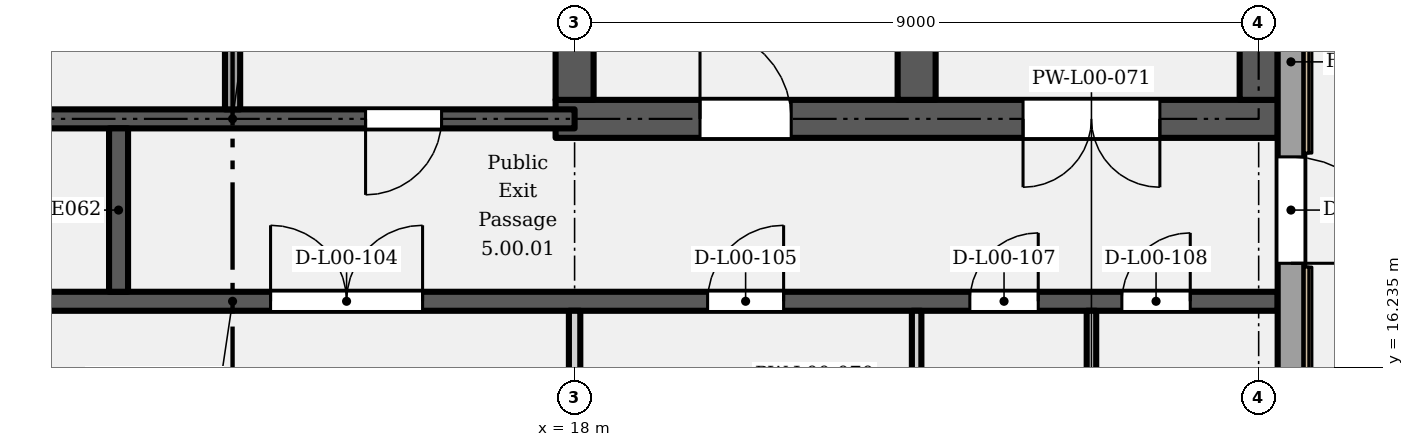
"""IFC4 building model, lengths in metres.
Left out: names, types, materials, properties, quantities, classifications, styles, units other than length and angle.
Written with IfcOpenShell. Run it as: python <this file> out.ifc"""

import sys

from ifc_helpers import new_model, si_unit, direction, frame, frame_2d, origin, place, context, subcontext, project, spatial, rectangle, extrude, element, fill, save


model = new_model("IFC4")
c1 = context("Model", 3, precision=1e-05, world=origin(), true_north=direction((0.0, 1.0)))
c2 = subcontext(c1, "Body", "Model", "MODEL_VIEW")
j1 = project(units=[si_unit("LENGTHUNIT", "METRE"), si_unit("PLANEANGLEUNIT", "RADIAN")], contexts=[c1])
p1 = place(None, origin())
s1 = spatial("IfcSite", under=j1, at=p1, CompositionType="ELEMENT")
p2 = place(p1, origin())
s2 = spatial("IfcBuilding", under=s1, at=p2, CompositionType="ELEMENT")
p3 = place(p2, origin())
s3 = spatial("IfcBuildingStorey", under=s2, at=p3, CompositionType="ELEMENT", Elevation=0.0)
p4 = place(p3, frame((17.75, 19.5, 0.0), z_axis=(0.0, 0.0, 1.0), x_axis=(1.0, 0.0, 0.0)))
e1 = element("IfcWall", 1, at=p4, inside=s3, PredefinedType="SHEAR", context=c2, shape_type="SweptSolid", body=[
    extrude(rectangle(XDim=9.5, YDim=0.5, at=frame_2d((4.75, 0.0))), origin(), (0.0, 0.0, 1.0), 6.3),
])
p5 = place(p4, frame((1.9, 0.0, 0.0)))
e2 = element("IfcOpeningElement", 2, at=p5, cuts=e1, PredefinedType="OPENING", context=c2, shape_type="SweptSolid", body=[
    extrude(rectangle(XDim=1.2, YDim=2.1, at=frame_2d((0.6, 1.05))), frame((0.0, 0.26, 0.0), z_axis=(0.0, -1.0, 0.0), x_axis=(1.0, 0.0, 0.0)), (0.0, 0.0, 1.0), 0.52),
])
p6 = place(p4, frame((7.95, 0.0, 0.0), z_axis=(0.0, 0.0, 1.0), x_axis=(-1.0, 0.0, 0.0)))
e3 = element("IfcOpeningElement", 3, at=p6, cuts=e1, PredefinedType="OPENING", context=c2, shape_type="SweptSolid", body=[
    extrude(rectangle(XDim=1.8, YDim=2.1, at=frame_2d((0.9, 1.05))), frame((0.0, 0.26, 0.0), z_axis=(0.0, -1.0, 0.0), x_axis=(1.0, 0.0, 0.0)), (0.0, 0.0, 1.0), 0.52),
])
p7 = place(p3, frame((18.0, 19.75, 0.0), z_axis=(0.0, 0.0, 1.0), x_axis=(0.0, 1.0, 0.0)))
e4 = element("IfcWall", 4, at=p7, inside=s3, PredefinedType="SHEAR", context=c2, shape_type="SweptSolid", body=[
    extrude(rectangle(XDim=8.05, YDim=0.5, at=frame_2d((4.025, 0.0))), origin(), (0.0, 0.0, 1.0), 6.3),
])
p8 = place(p3, frame((22.5, 19.75, 0.0), z_axis=(0.0, 0.0, 1.0), x_axis=(0.0, 1.0, 0.0)))
e5 = element("IfcWall", 5, at=p8, inside=s3, PredefinedType="SHEAR", context=c2, shape_type="SweptSolid", body=[
    extrude(rectangle(XDim=8.5, YDim=0.5, at=frame_2d((4.25, 0.0))), origin(), (0.0, 0.0, 1.0), 6.3),
])
p9 = place(p3, frame((27.0, 19.75, 0.0), z_axis=(0.0, 0.0, 1.0), x_axis=(0.0, 1.0, 0.0)))
e6 = element("IfcWall", 6, at=p9, inside=s3, PredefinedType="SHEAR", context=c2, shape_type="SweptSolid", body=[
    extrude(rectangle(XDim=8.05, YDim=0.5, at=frame_2d((4.025, 0.0))), origin(), (0.0, 0.0, 1.0), 6.3),
])
p10 = place(p3, frame((27.425, 12.7, 0.0), z_axis=(0.0, 0.0, 1.0), x_axis=(0.0, 1.0, 0.0)))
e7 = element("IfcWall", 7, at=p10, inside=s3, PredefinedType="SOLIDWALL", context=c2, shape_type="SweptSolid", body=[
    extrude(rectangle(XDim=15.1, YDim=0.35, at=frame_2d((7.55, 0.0))), origin(), (0.0, 0.0, 1.0), 6.3),
])
p11 = place(p10, frame((6.3, 0.0, 0.0), z_axis=(0.0, 0.0, 1.0), x_axis=(-1.0, 0.0, 0.0)))
e8 = element("IfcOpeningElement", 8, at=p11, cuts=e7, PredefinedType="OPENING", context=c2, shape_type="SweptSolid", body=[
    extrude(rectangle(XDim=1.4, YDim=2.1, at=frame_2d((0.7, 1.05))), frame((0.0, 0.185, 0.0), z_axis=(0.0, -1.0, 0.0), x_axis=(1.0, 0.0, 0.0)), (0.0, 0.0, 1.0), 0.37),
])
p12 = place(p3, frame((-0.25, 17.1, 0.0), z_axis=(0.0, 0.0, 1.0), x_axis=(1.0, 0.0, 0.0)))
e9 = element("IfcWall", 9, at=p12, inside=s3, PredefinedType="SHEAR", context=c2, shape_type="SweptSolid", body=[
    extrude(rectangle(XDim=27.5, YDim=0.25, at=frame_2d((13.75, 0.0))), origin(), (0.0, 0.0, 1.0), 6.3),
])
p13 = place(p12, frame((4.15, 0.0, 0.0)))
e10 = element("IfcOpeningElement", 10, at=p13, cuts=e9, PredefinedType="OPENING", context=c2, shape_type="SweptSolid", body=[
    extrude(rectangle(XDim=1.2, YDim=2.1, at=frame_2d((0.6, 1.05))), frame((0.0, 0.135, 0.0), z_axis=(0.0, -1.0, 0.0), x_axis=(1.0, 0.0, 0.0)), (0.0, 0.0, 1.0), 0.27),
])
p14 = place(p12, frame((14.25, 0.0, 0.0)))
e11 = element("IfcOpeningElement", 11, at=p14, cuts=e9, PredefinedType="OPENING", context=c2, shape_type="SweptSolid", body=[
    extrude(rectangle(XDim=2.0, YDim=2.1, at=frame_2d((1.0, 1.05))), frame((0.0, 0.135, 0.0), z_axis=(0.0, -1.0, 0.0), x_axis=(1.0, 0.0, 0.0)), (0.0, 0.0, 1.0), 0.27),
])
p15 = place(p12, frame((20.0, 0.0, 0.0)))
e12 = element("IfcOpeningElement", 12, at=p15, cuts=e9, PredefinedType="OPENING", context=c2, shape_type="SweptSolid", body=[
    extrude(rectangle(XDim=1.0, YDim=2.1, at=frame_2d((0.5, 1.05))), frame((0.0, 0.135, 0.0), z_axis=(0.0, -1.0, 0.0), x_axis=(1.0, 0.0, 0.0)), (0.0, 0.0, 1.0), 0.27),
])
p16 = place(p12, frame((23.45, 0.0, 0.0)))
e13 = element("IfcOpeningElement", 13, at=p16, cuts=e9, PredefinedType="OPENING", context=c2, shape_type="SweptSolid", body=[
    extrude(rectangle(XDim=0.9, YDim=2.1, at=frame_2d((0.45, 1.05))), frame((0.0, 0.135, 0.0), z_axis=(0.0, -1.0, 0.0), x_axis=(1.0, 0.0, 0.0)), (0.0, 0.0, 1.0), 0.27),
])
p17 = place(p12, frame((25.45, 0.0, 0.0)))
e14 = element("IfcOpeningElement", 14, at=p17, cuts=e9, PredefinedType="OPENING", context=c2, shape_type="SweptSolid", body=[
    extrude(rectangle(XDim=0.9, YDim=2.1, at=frame_2d((0.45, 1.05))), frame((0.0, 0.135, 0.0), z_axis=(0.0, -1.0, 0.0), x_axis=(1.0, 0.0, 0.0)), (0.0, 0.0, 1.0), 0.27),
])
p18 = place(p3, frame((9.0, 19.5, 0.0), z_axis=(0.0, 0.0, 1.0), x_axis=(1.0, 0.0, 0.0)))
e15 = element("IfcWall", 15, at=p18, inside=s3, PredefinedType="SHEAR", context=c2, shape_type="SweptSolid", body=[
    extrude(rectangle(XDim=9.0, YDim=0.25, at=frame_2d((4.5, 0.0))), origin(), (0.0, 0.0, 1.0), 6.3),
])
p19 = place(p18, frame((2.0, 0.0, 0.0), z_axis=(0.0, 0.0, 1.0), x_axis=(-1.0, 0.0, 0.0)))
e16 = element("IfcOpeningElement", 16, at=p19, cuts=e15, PredefinedType="OPENING", context=c2, shape_type="SweptSolid", body=[
    extrude(rectangle(XDim=1.0, YDim=2.1, at=frame_2d((0.5, 1.05))), frame((0.0, 0.135, 0.0), z_axis=(0.0, -1.0, 0.0), x_axis=(1.0, 0.0, 0.0)), (0.0, 0.0, 1.0), 0.27),
])
p20 = place(p18, frame((7.25, 0.0, 0.0), z_axis=(0.0, 0.0, 1.0), x_axis=(-1.0, 0.0, 0.0)))
e17 = element("IfcOpeningElement", 17, at=p20, cuts=e15, PredefinedType="OPENING", context=c2, shape_type="SweptSolid", body=[
    extrude(rectangle(XDim=1.0, YDim=2.1, at=frame_2d((0.5, 1.05))), frame((0.0, 0.135, 0.0), z_axis=(0.0, -1.0, 0.0), x_axis=(1.0, 0.0, 0.0)), (0.0, 0.0, 1.0), 0.27),
])
p21 = place(p3, frame((12.0, 17.225, 0.0), z_axis=(0.0, 0.0, 1.0), x_axis=(0.0, 1.0, 0.0)))
e18 = element("IfcWall", 18, at=p21, inside=s3, PredefinedType="SHEAR", context=c2, shape_type="SweptSolid", body=[
    extrude(rectangle(XDim=2.15, YDim=0.25, at=frame_2d((1.075, 0.0))), origin(), (0.0, 0.0, 1.0), 6.3),
])
p22 = place(p3, frame((13.5, 19.625, 0.0), z_axis=(0.0, 0.0, 1.0), x_axis=(0.0, 1.0, 0.0)))
e19 = element("IfcWall", 19, at=p22, inside=s3, PredefinedType="PARTITIONING", context=c2, shape_type="SweptSolid", body=[
    extrude(rectangle(XDim=3.375, YDim=0.2, at=frame_2d((1.688, 0.0))), origin(), (0.0, 0.0, 1.0), 6.3),
])
p23 = place(p3, frame((18.0, 12.7, 0.0), z_axis=(0.0, 0.0, 1.0), x_axis=(0.0, 1.0, 0.0)))
e20 = element("IfcWall", 20, at=p23, inside=s3, PredefinedType="PARTITIONING", context=c2, shape_type="SweptSolid", body=[
    extrude(rectangle(XDim=4.275, YDim=0.15, at=frame_2d((2.138, 0.0))), origin(), (0.0, 0.0, 1.0), 5.35),
])
p24 = place(p3, frame((22.5, 12.6, 0.0), z_axis=(0.0, 0.0, 1.0), x_axis=(0.0, 1.0, 0.0)))
e21 = element("IfcWall", 21, at=p24, inside=s3, PredefinedType="PARTITIONING", context=c2, shape_type="SweptSolid", body=[
    extrude(rectangle(XDim=4.375, YDim=0.125, at=frame_2d((2.188, 0.0))), origin(), (0.0, 0.0, 1.0), 6.3),
])
p25 = place(p3, frame((24.8, 12.663, 0.0), z_axis=(0.0, 0.0, 1.0), x_axis=(0.0, 1.0, 0.0)))
e22 = element("IfcWall", 22, at=p25, inside=s3, PredefinedType="PARTITIONING", context=c2, shape_type="SweptSolid", body=[
    extrude(rectangle(XDim=4.312, YDim=0.125, at=frame_2d((2.156, 0.0))), origin(), (0.0, 0.0, 1.0), 6.3),
])
p26 = place(p11, origin())
e23 = element("IfcDoor", 23, at=p26, inside=s3, OperationType="SINGLE_SWING_LEFT", PredefinedType="DOOR", context=c2, shape_type="SweptSolid", body=[
    extrude(rectangle(XDim=1.4, YDim=2.1, at=frame_2d((0.7, 1.05))), frame((0.0, 0.025, 0.0), z_axis=(0.0, -1.0, 0.0), x_axis=(1.0, 0.0, 0.0)), (0.0, 0.0, 1.0), 0.05),
])
fill(e8, e23)
p27 = place(p5, origin())
e24 = element("IfcDoor", 24, at=p27, inside=s3, OperationType="SINGLE_SWING_LEFT", PredefinedType="DOOR", context=c2, shape_type="SweptSolid", body=[
    extrude(rectangle(XDim=1.2, YDim=2.1, at=frame_2d((0.6, 1.05))), frame((0.0, 0.025, 0.0), z_axis=(0.0, -1.0, 0.0), x_axis=(1.0, 0.0, 0.0)), (0.0, 0.0, 1.0), 0.05),
])
fill(e2, e24)
p28 = place(p6, origin())
e25 = element("IfcDoor", 25, at=p28, inside=s3, OperationType="DOUBLE_DOOR_SINGLE_SWING", PredefinedType="DOOR", context=c2, shape_type="SweptSolid", body=[
    extrude(rectangle(XDim=1.8, YDim=2.1, at=frame_2d((0.9, 1.05))), frame((0.0, 0.025, 0.0), z_axis=(0.0, -1.0, 0.0), x_axis=(1.0, 0.0, 0.0)), (0.0, 0.0, 1.0), 0.05),
])
fill(e3, e25)
p29 = place(p14, origin())
e26 = element("IfcDoor", 26, at=p29, inside=s3, OperationType="DOUBLE_DOOR_SINGLE_SWING", PredefinedType="DOOR", context=c2, shape_type="SweptSolid", body=[
    extrude(rectangle(XDim=2.0, YDim=2.1, at=frame_2d((1.0, 1.05))), frame((0.0, 0.025, 0.0), z_axis=(0.0, -1.0, 0.0), x_axis=(1.0, 0.0, 0.0)), (0.0, 0.0, 1.0), 0.05),
])
fill(e11, e26)
p30 = place(p15, origin())
e27 = element("IfcDoor", 27, at=p30, inside=s3, OperationType="SINGLE_SWING_RIGHT", PredefinedType="DOOR", context=c2, shape_type="SweptSolid", body=[
    extrude(rectangle(XDim=1.0, YDim=2.1, at=frame_2d((0.5, 1.05))), frame((0.0, 0.025, 0.0), z_axis=(0.0, -1.0, 0.0), x_axis=(1.0, 0.0, 0.0)), (0.0, 0.0, 1.0), 0.05),
])
fill(e12, e27)
p31 = place(p16, origin())
e28 = element("IfcDoor", 28, at=p31, inside=s3, OperationType="SINGLE_SWING_RIGHT", PredefinedType="DOOR", context=c2, shape_type="SweptSolid", body=[
    extrude(rectangle(XDim=0.9, YDim=2.1, at=frame_2d((0.45, 1.05))), frame((0.0, 0.025, 0.0), z_axis=(0.0, -1.0, 0.0), x_axis=(1.0, 0.0, 0.0)), (0.0, 0.0, 1.0), 0.05),
])
fill(e13, e28)
p32 = place(p17, origin())
e29 = element("IfcDoor", 29, at=p32, inside=s3, OperationType="SINGLE_SWING_RIGHT", PredefinedType="DOOR", context=c2, shape_type="SweptSolid", body=[
    extrude(rectangle(XDim=0.9, YDim=2.1, at=frame_2d((0.45, 1.05))), frame((0.0, 0.025, 0.0), z_axis=(0.0, -1.0, 0.0), x_axis=(1.0, 0.0, 0.0)), (0.0, 0.0, 1.0), 0.05),
])
fill(e14, e29)
p33 = place(p20, origin())
e30 = element("IfcDoor", 30, at=p33, inside=s3, OperationType="SINGLE_SWING_RIGHT", PredefinedType="DOOR", context=c2, shape_type="SweptSolid", body=[
    extrude(rectangle(XDim=1.0, YDim=2.1, at=frame_2d((0.5, 1.05))), frame((0.0, 0.025, 0.0), z_axis=(0.0, -1.0, 0.0), x_axis=(1.0, 0.0, 0.0)), (0.0, 0.0, 1.0), 0.05),
])
fill(e17, e30)
save(model, sys.argv[1])
